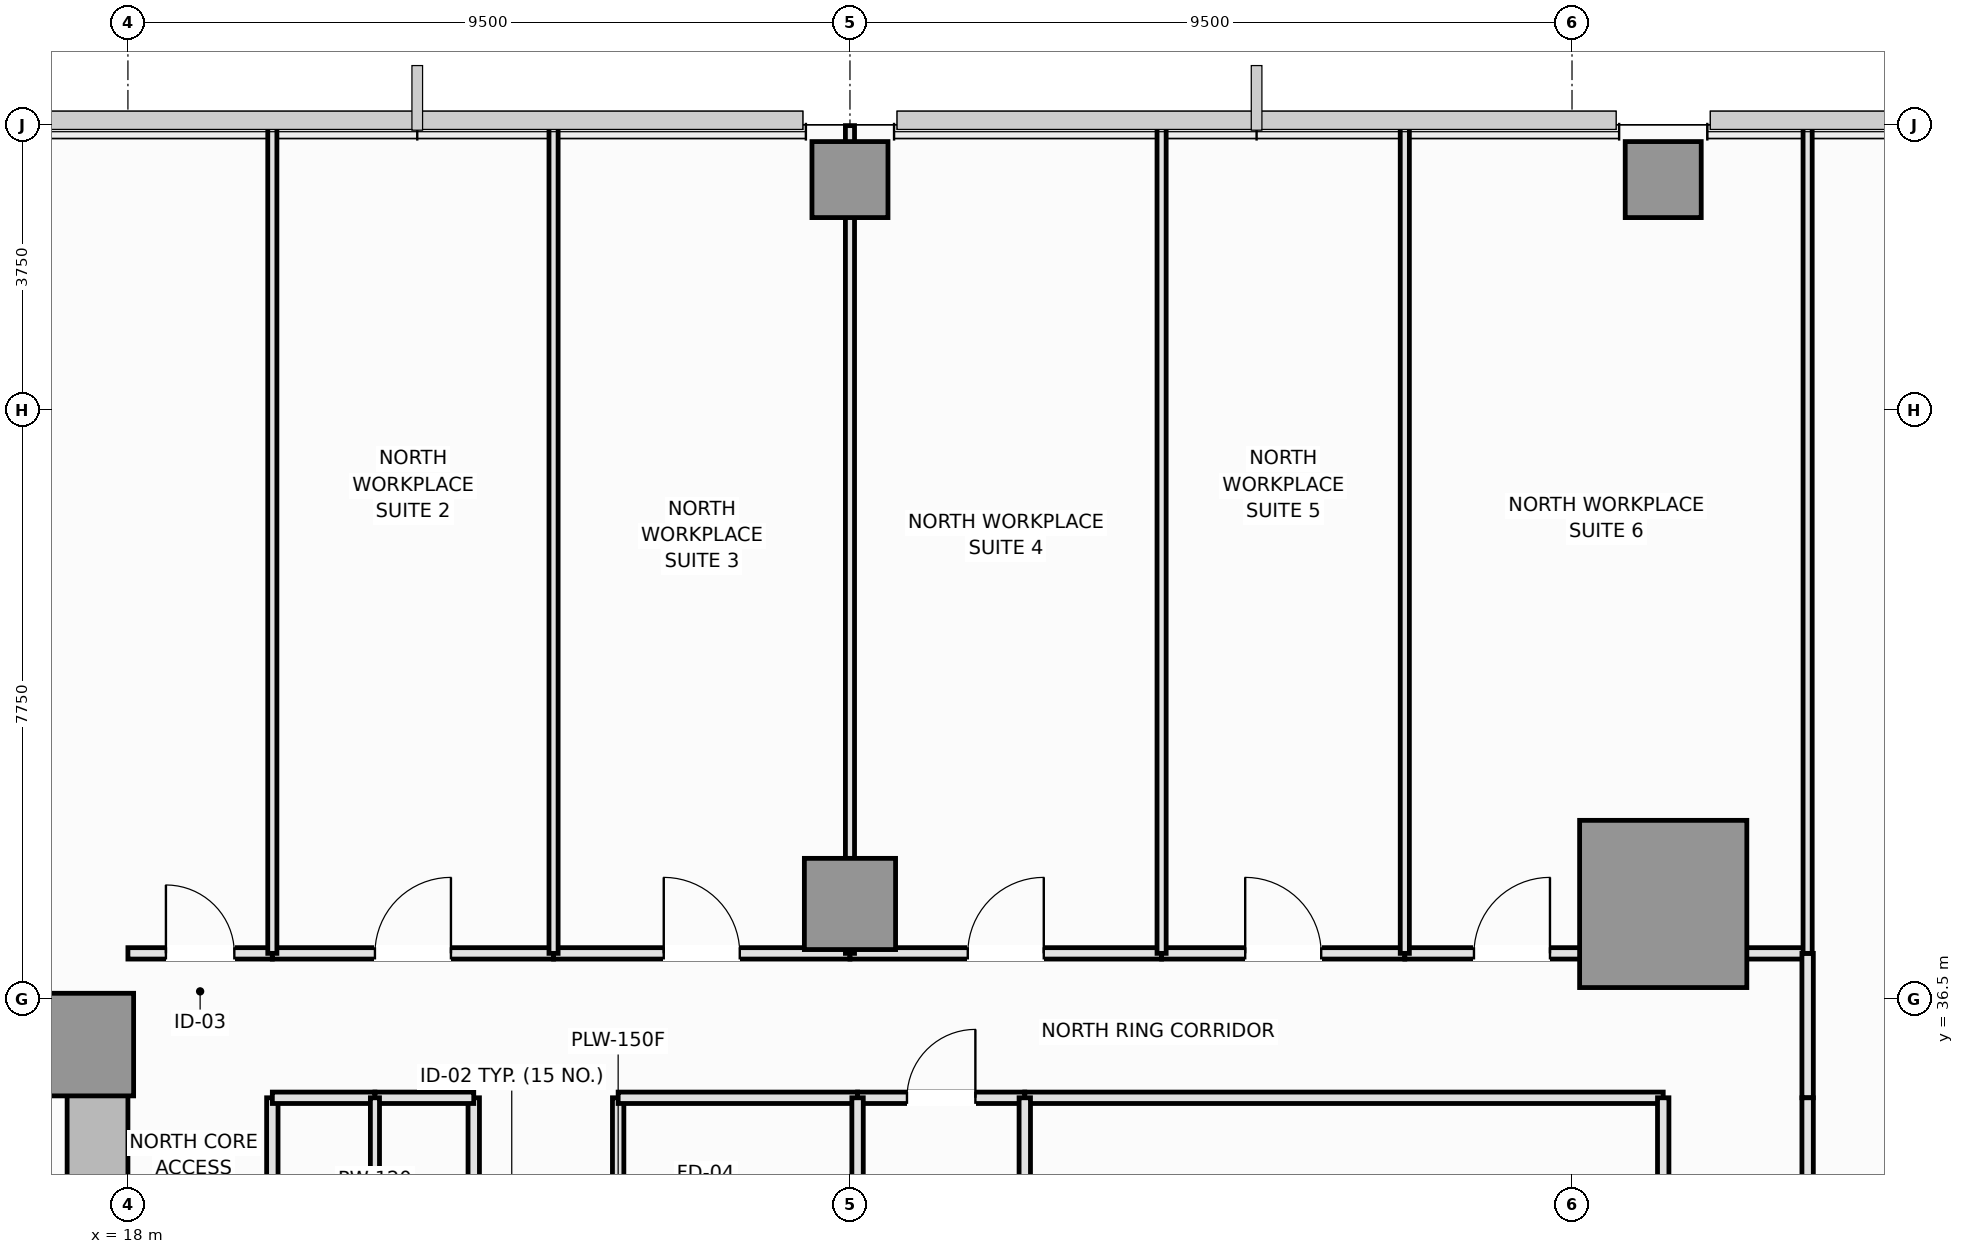
"""IFC4 building model, lengths in metres.
Left out: names, types, materials, properties, quantities, classifications, styles, units other than length and angle.
Written with IfcOpenShell. Run it as: python <this file> out.ifc"""

import sys

from ifc_helpers import new_model, si_unit, direction, frame, frame_2d, origin, origin_2d, place, context, subcontext, project, spatial, rectangle, extrude, element, fill, save


model = new_model("IFC4")
c1 = context("Model", 3, precision=1e-05, world=origin(), true_north=direction((0.0, 1.0)))
c2 = subcontext(c1, "Body", "Model", "MODEL_VIEW")
j1 = project(units=[si_unit("LENGTHUNIT", "METRE"), si_unit("PLANEANGLEUNIT", "RADIAN")], contexts=[c1])
p1 = place(None, origin())
s1 = spatial("IfcSite", under=j1, at=p1, CompositionType="ELEMENT")
p2 = place(p1, origin())
s2 = spatial("IfcBuilding", under=s1, at=p2, CompositionType="ELEMENT")
p3 = place(p2, frame((0.0, 0.0, 54.0)))
s3 = spatial("IfcBuildingStorey", under=s2, at=p3, CompositionType="ELEMENT", Elevation=54.0)
p4 = place(p3, frame((4.5, 36.1, 0.0), z_axis=(0.0, 0.0, 1.0), x_axis=(1.0, 0.0, 0.0)))
e1 = element("IfcWall", 1, at=p4, inside=s3, PredefinedType="SHEAR", context=c2, shape_type="SweptSolid", body=[
    extrude(rectangle(XDim=13.5, YDim=0.8, at=frame_2d((6.75, 0.0))), origin(), (0.0, 0.0, 1.0), 3.55),
])
p5 = place(p3, frame((17.6, 27.05, 0.0), z_axis=(0.0, 0.0, 1.0), x_axis=(0.0, 1.0, 0.0)))
e2 = element("IfcWall", 2, at=p5, inside=s3, PredefinedType="SHEAR", context=c2, shape_type="SweptSolid", body=[
    extrude(rectangle(XDim=8.65, YDim=0.8, at=frame_2d((4.325, 0.0))), origin(), (0.0, 0.0, 1.0), 3.55),
])
p6 = place(p5, frame((3.45, 0.0, 0.0)))
e3 = element("IfcOpeningElement", 3, at=p6, cuts=e2, PredefinedType="OPENING", context=c2, shape_type="SweptSolid", body=[
    extrude(rectangle(XDim=1.1, YDim=2.15, at=frame_2d((0.55, 1.075))), frame((0.0, 0.41, 0.0), z_axis=(0.0, -1.0, 0.0), x_axis=(1.0, 0.0, 0.0)), (0.0, 0.0, 1.0), 0.82),
])
p7 = place(p3, frame((17.4, 35.9, 0.0), z_axis=(0.0, 0.0, 1.0), x_axis=(1.0, 0.0, 0.0)))
e4 = element("IfcColumn", 4, at=p7, inside=s3, PredefinedType="PILASTER", context=c2, shape_type="SweptSolid", body=[
    extrude(rectangle(XDim=1.35, YDim=1.35, at=origin_2d()), origin(), (0.0, 0.0, 1.0), 3.55),
])
p8 = place(p3, frame((38.2, 37.75, 0.0), z_axis=(0.0, 0.0, 1.0), x_axis=(1.0, 0.0, 0.0)))
e5 = element("IfcColumn", 5, at=p8, inside=s3, PredefinedType="COLUMN", context=c2, shape_type="SweptSolid", body=[
    extrude(rectangle(XDim=2.2, YDim=2.2, at=origin_2d()), origin(), (0.0, 0.0, 1.0), 3.55),
])
p9 = place(p3, frame((27.5, 37.75, 0.0), z_axis=(0.0, 0.0, 1.0), x_axis=(1.0, 0.0, 0.0)))
e6 = element("IfcColumn", 6, at=p9, inside=s3, PredefinedType="COLUMN", context=c2, shape_type="SweptSolid", body=[
    extrude(rectangle(XDim=1.2, YDim=1.2, at=origin_2d()), origin(), (0.0, 0.0, 1.0), 3.55),
])
for number, where, z_axis, x_axis in (
    (7, (27.5, 47.28, 0.0), (0.0, 0.0, 1.0), (1.0, 0.0, 0.0)),
    (8, (38.2, 47.28, 0.0), (0.0, 0.0, 1.0), (1.0, 0.0, 0.0)),
):
    element("IfcColumn", number, at=place(p3, frame(where, z_axis=z_axis, x_axis=x_axis)), inside=s3, PredefinedType="COLUMN", context=c2, shape_type="SweptSolid", body=[
        extrude(rectangle(XDim=1.0, YDim=1.0, at=origin_2d()), origin(), (0.0, 0.0, 1.0), 3.55),
    ])
p10 = place(p3, frame((22.55, 29.75, 0.0), z_axis=(0.0, 0.0, 1.0), x_axis=(0.0, 1.0, 0.0)))
e9 = element("IfcWall", 9, at=p10, inside=s3, PredefinedType="PARTITIONING", context=c2, shape_type="SweptSolid", body=[
    extrude(rectangle(XDim=5.45, YDim=0.15, at=frame_2d((2.725, 0.0))), origin(), (0.0, 0.0, 1.0), 3.01),
])
p11 = place(p10, frame((2.225, 0.0, 0.0)))
e10 = element("IfcOpeningElement", 10, at=p11, cuts=e9, PredefinedType="OPENING", context=c2, shape_type="SweptSolid", body=[
    extrude(rectangle(XDim=1.0, YDim=2.15, at=frame_2d((0.5, 1.075))), frame((0.0, 0.085, 0.0), z_axis=(0.0, -1.0, 0.0), x_axis=(1.0, 0.0, 0.0)), (0.0, 0.0, 1.0), 0.17),
])
p12 = place(p3, frame((24.45, 32.1, 0.0), z_axis=(0.0, 0.0, 1.0), x_axis=(0.0, 1.0, 0.0)))
e11 = element("IfcWall", 11, at=p12, inside=s3, PredefinedType="PLUMBINGWALL", context=c2, shape_type="SweptSolid", body=[
    extrude(rectangle(XDim=3.1, YDim=0.15, at=frame_2d((1.55, 0.0))), origin(), (0.0, 0.0, 1.0), 3.37),
])
p13 = place(p12, frame((1.1, 0.0, 0.0)))
e12 = element("IfcOpeningElement", 12, at=p13, cuts=e11, PredefinedType="OPENING", context=c2, shape_type="SweptSolid", body=[
    extrude(rectangle(XDim=0.9, YDim=2.1, at=frame_2d((0.45, 1.05))), frame((0.0, 0.085, 0.0), z_axis=(0.0, -1.0, 0.0), x_axis=(1.0, 0.0, 0.0)), (0.0, 0.0, 1.0), 0.17),
])
p14 = place(p3, frame((19.9, 29.75, 0.0), z_axis=(0.0, 0.0, 1.0), x_axis=(0.0, 1.0, 0.0)))
e13 = element("IfcWall", 13, at=p14, inside=s3, PredefinedType="PARTITIONING", context=c2, shape_type="SweptSolid", body=[
    extrude(rectangle(XDim=5.45, YDim=0.15, at=frame_2d((2.725, 0.0))), origin(), (0.0, 0.0, 1.0), 3.37),
])
p15 = place(p14, frame((2.225, 0.0, 0.0)))
e14 = element("IfcOpeningElement", 14, at=p15, cuts=e13, PredefinedType="OPENING", context=c2, shape_type="SweptSolid", body=[
    extrude(rectangle(XDim=1.0, YDim=2.15, at=frame_2d((0.5, 1.075))), frame((0.0, 0.085, 0.0), z_axis=(0.0, -1.0, 0.0), x_axis=(1.0, 0.0, 0.0)), (0.0, 0.0, 1.0), 0.17),
])
p16 = place(p3, frame((19.9, 35.2, 0.0), z_axis=(0.0, 0.0, 1.0), x_axis=(1.0, 0.0, 0.0)))
e15 = element("IfcWall", 15, at=p16, inside=s3, PredefinedType="PARTITIONING", context=c2, shape_type="SweptSolid", body=[
    extrude(rectangle(XDim=1.35, YDim=0.15, at=frame_2d((0.675, 0.0))), origin(), (0.0, 0.0, 1.0), 3.37),
])
p17 = place(p3, frame((21.25, 35.2, 0.0), z_axis=(0.0, 0.0, 1.0), x_axis=(1.0, 0.0, 0.0)))
e16 = element("IfcWall", 16, at=p17, inside=s3, PredefinedType="PARTITIONING", context=c2, shape_type="SweptSolid", body=[
    extrude(rectangle(XDim=1.3, YDim=0.15, at=frame_2d((0.65, 0.0))), origin(), (0.0, 0.0, 1.0), 3.37),
])
p18 = place(p3, frame((24.45, 35.2, 0.0), z_axis=(0.0, 0.0, 1.0), x_axis=(1.0, 0.0, 0.0)))
e17 = element("IfcWall", 17, at=p18, inside=s3, PredefinedType="PLUMBINGWALL", context=c2, shape_type="SweptSolid", body=[
    extrude(rectangle(XDim=3.15, YDim=0.15, at=frame_2d((1.575, 0.0))), origin(), (0.0, 0.0, 1.0), 3.37),
])
p19 = place(p3, frame((27.6, 35.2, 0.0), z_axis=(0.0, 0.0, 1.0), x_axis=(1.0, 0.0, 0.0)))
e18 = element("IfcWall", 18, at=p19, inside=s3, PredefinedType="PLUMBINGWALL", context=c2, shape_type="SweptSolid", body=[
    extrude(rectangle(XDim=2.2, YDim=0.15, at=frame_2d((1.1, 0.0))), origin(), (0.0, 0.0, 1.0), 3.37),
])
p20 = place(p19, frame((0.65, 0.0, 0.0)))
e19 = element("IfcOpeningElement", 19, at=p20, cuts=e18, PredefinedType="OPENING", context=c2, shape_type="SweptSolid", body=[
    extrude(rectangle(XDim=0.9, YDim=2.1, at=frame_2d((0.45, 1.05))), frame((0.0, 0.085, 0.0), z_axis=(0.0, -1.0, 0.0), x_axis=(1.0, 0.0, 0.0)), (0.0, 0.0, 1.0), 0.17),
])
p21 = place(p3, frame((29.8, 35.2, 0.0), z_axis=(0.0, 0.0, 1.0), x_axis=(1.0, 0.0, 0.0)))
e20 = element("IfcWall", 20, at=p21, inside=s3, PredefinedType="PARTITIONING", context=c2, shape_type="SweptSolid", body=[
    extrude(rectangle(XDim=8.4, YDim=0.15, at=frame_2d((4.2, 0.0))), origin(), (0.0, 0.0, 1.0), 3.37),
])
p22 = place(p3, frame((18.0, 37.1, 0.0), z_axis=(0.0, 0.0, 1.0), x_axis=(1.0, 0.0, 0.0)))
e21 = element("IfcWall", 21, at=p22, inside=s3, PredefinedType="PARTITIONING", context=c2, shape_type="SweptSolid", body=[
    extrude(rectangle(XDim=1.9, YDim=0.15, at=frame_2d((0.95, 0.0))), origin(), (0.0, 0.0, 1.0), 3.37),
])
p23 = place(p22, frame((0.5, 0.0, 0.0)))
e22 = element("IfcOpeningElement", 22, at=p23, cuts=e21, PredefinedType="OPENING", context=c2, shape_type="SweptSolid", body=[
    extrude(rectangle(XDim=0.9, YDim=2.1, at=frame_2d((0.45, 1.05))), frame((0.0, 0.085, 0.0), z_axis=(0.0, -1.0, 0.0), x_axis=(1.0, 0.0, 0.0)), (0.0, 0.0, 1.0), 0.17),
])
p24 = place(p3, frame((19.9, 37.1, 0.0), z_axis=(0.0, 0.0, 1.0), x_axis=(1.0, 0.0, 0.0)))
e23 = element("IfcWall", 23, at=p24, inside=s3, PredefinedType="PARTITIONING", context=c2, shape_type="SweptSolid", body=[
    extrude(rectangle(XDim=3.7, YDim=0.15, at=frame_2d((1.85, 0.0))), origin(), (0.0, 0.0, 1.0), 3.37),
])
p25 = place(p24, frame((1.35, 0.0, 0.0)))
e24 = element("IfcOpeningElement", 24, at=p25, cuts=e23, PredefinedType="OPENING", context=c2, shape_type="SweptSolid", body=[
    extrude(rectangle(XDim=1.0, YDim=2.15, at=frame_2d((0.5, 1.075))), frame((0.0, 0.085, 0.0), z_axis=(0.0, -1.0, 0.0), x_axis=(1.0, 0.0, 0.0)), (0.0, 0.0, 1.0), 0.17),
])
p26 = place(p3, frame((23.6, 37.1, 0.0), z_axis=(0.0, 0.0, 1.0), x_axis=(1.0, 0.0, 0.0)))
e25 = element("IfcWall", 25, at=p26, inside=s3, PredefinedType="PARTITIONING", context=c2, shape_type="SweptSolid", body=[
    extrude(rectangle(XDim=3.9, YDim=0.15, at=frame_2d((1.95, 0.0))), origin(), (0.0, 0.0, 1.0), 3.37),
])
p27 = place(p26, frame((1.45, 0.0, 0.0)))
e26 = element("IfcOpeningElement", 26, at=p27, cuts=e25, PredefinedType="OPENING", context=c2, shape_type="SweptSolid", body=[
    extrude(rectangle(XDim=1.0, YDim=2.15, at=frame_2d((0.5, 1.075))), frame((0.0, 0.085, 0.0), z_axis=(0.0, -1.0, 0.0), x_axis=(1.0, 0.0, 0.0)), (0.0, 0.0, 1.0), 0.17),
])
p28 = place(p3, frame((27.5, 37.1, 0.0), z_axis=(0.0, 0.0, 1.0), x_axis=(1.0, 0.0, 0.0)))
e27 = element("IfcWall", 27, at=p28, inside=s3, PredefinedType="PARTITIONING", context=c2, shape_type="SweptSolid", body=[
    extrude(rectangle(XDim=4.1, YDim=0.15, at=frame_2d((2.05, 0.0))), origin(), (0.0, 0.0, 1.0), 3.37),
])
p29 = place(p28, frame((1.55, 0.0, 0.0)))
e28 = element("IfcOpeningElement", 28, at=p29, cuts=e27, PredefinedType="OPENING", context=c2, shape_type="SweptSolid", body=[
    extrude(rectangle(XDim=1.0, YDim=2.15, at=frame_2d((0.5, 1.075))), frame((0.0, 0.085, 0.0), z_axis=(0.0, -1.0, 0.0), x_axis=(1.0, 0.0, 0.0)), (0.0, 0.0, 1.0), 0.17),
])
p30 = place(p3, frame((31.6, 37.1, 0.0), z_axis=(0.0, 0.0, 1.0), x_axis=(1.0, 0.0, 0.0)))
e29 = element("IfcWall", 29, at=p30, inside=s3, PredefinedType="PARTITIONING", context=c2, shape_type="SweptSolid", body=[
    extrude(rectangle(XDim=3.2, YDim=0.15, at=frame_2d((1.6, 0.0))), origin(), (0.0, 0.0, 1.0), 3.37),
])
p31 = place(p30, frame((1.1, 0.0, 0.0)))
e30 = element("IfcOpeningElement", 30, at=p31, cuts=e29, PredefinedType="OPENING", context=c2, shape_type="SweptSolid", body=[
    extrude(rectangle(XDim=1.0, YDim=2.15, at=frame_2d((0.5, 1.075))), frame((0.0, 0.085, 0.0), z_axis=(0.0, -1.0, 0.0), x_axis=(1.0, 0.0, 0.0)), (0.0, 0.0, 1.0), 0.17),
])
p32 = place(p3, frame((34.8, 37.1, 0.0), z_axis=(0.0, 0.0, 1.0), x_axis=(1.0, 0.0, 0.0)))
e31 = element("IfcWall", 31, at=p32, inside=s3, PredefinedType="PARTITIONING", context=c2, shape_type="SweptSolid", body=[
    extrude(rectangle(XDim=5.3, YDim=0.15, at=frame_2d((2.65, 0.0))), origin(), (0.0, 0.0, 1.0), 3.37),
])
p33 = place(p32, frame((0.91, 0.0, 0.0)))
e32 = element("IfcOpeningElement", 32, at=p33, cuts=e31, PredefinedType="OPENING", context=c2, shape_type="SweptSolid", body=[
    extrude(rectangle(XDim=1.0, YDim=2.15, at=frame_2d((0.5, 1.075))), frame((0.0, 0.085, 0.0), z_axis=(0.0, -1.0, 0.0), x_axis=(1.0, 0.0, 0.0)), (0.0, 0.0, 1.0), 0.17),
])
p34 = place(p3, frame((40.1, 35.2, 0.0), z_axis=(0.0, 0.0, 1.0), x_axis=(0.0, 1.0, 0.0)))
e33 = element("IfcWall", 33, at=p34, inside=s3, PredefinedType="PARTITIONING", context=c2, shape_type="SweptSolid", body=[
    extrude(rectangle(XDim=1.9, YDim=0.15, at=frame_2d((0.95, 0.0))), origin(), (0.0, 0.0, 1.0), 3.37),
])
p35 = place(p3, frame((38.2, 32.1, 0.0), z_axis=(0.0, 0.0, 1.0), x_axis=(0.0, 1.0, 0.0)))
e34 = element("IfcWall", 34, at=p35, inside=s3, PredefinedType="PARTITIONING", context=c2, shape_type="SweptSolid", body=[
    extrude(rectangle(XDim=3.1, YDim=0.15, at=frame_2d((1.55, 0.0))), origin(), (0.0, 0.0, 1.0), 2.82),
])
p36 = place(p35, frame((1.05, 0.0, 0.0)))
e35 = element("IfcOpeningElement", 35, at=p36, cuts=e34, PredefinedType="OPENING", context=c2, shape_type="SweptSolid", body=[
    extrude(rectangle(XDim=1.0, YDim=2.15, at=frame_2d((0.5, 1.075))), frame((0.0, 0.085, 0.0), z_axis=(0.0, -1.0, 0.0), x_axis=(1.0, 0.0, 0.0)), (0.0, 0.0, 1.0), 0.17),
])
p37 = place(p3, frame((40.1, 32.0, 0.0), z_axis=(0.0, 0.0, 1.0), x_axis=(0.0, 1.0, 0.0)))
e36 = element("IfcWall", 36, at=p37, inside=s3, PredefinedType="PARTITIONING", context=c2, shape_type="SweptSolid", body=[
    extrude(rectangle(XDim=3.2, YDim=0.15, at=frame_2d((1.6, 0.0))), origin(), (0.0, 0.0, 1.0), 3.37),
])
p38 = place(p37, frame((1.1, 0.0, 0.0)))
e37 = element("IfcOpeningElement", 37, at=p38, cuts=e36, PredefinedType="OPENING", context=c2, shape_type="SweptSolid", body=[
    extrude(rectangle(XDim=1.0, YDim=2.15, at=frame_2d((0.5, 1.075))), frame((0.0, 0.085, 0.0), z_axis=(0.0, -1.0, 0.0), x_axis=(1.0, 0.0, 0.0)), (0.0, 0.0, 1.0), 0.17),
])
p39 = place(p3, frame((21.25, 29.75, 0.0), z_axis=(0.0, 0.0, 1.0), x_axis=(0.0, 1.0, 0.0)))
e38 = element("IfcWall", 38, at=p39, inside=s3, PredefinedType="PARTITIONING", context=c2, shape_type="SweptSolid", body=[
    extrude(rectangle(XDim=5.45, YDim=0.12, at=frame_2d((2.725, 0.0))), origin(), (0.0, 0.0, 1.0), 3.37),
])
for number, where, z_axis, x_axis in (
    (39, (27.6, 32.1, 0.0), (0.0, 0.0, 1.0), (0.0, 1.0, 0.0)),
    (40, (29.8, 32.1, 0.0), (0.0, 0.0, 1.0), (0.0, 1.0, 0.0)),
):
    element("IfcWall", number, at=place(p3, frame(where, z_axis=z_axis, x_axis=x_axis)), inside=s3, PredefinedType="PLUMBINGWALL", context=c2, shape_type="SweptSolid", body=[
        extrude(rectangle(XDim=3.1, YDim=0.15, at=frame_2d((1.55, 0.0))), origin(), (0.0, 0.0, 1.0), 3.37),
    ])
for number, where, z_axis, x_axis in (
    (41, (19.9, 37.1, 0.0), (0.0, 0.0, 1.0), (0.0, 1.0, 0.0)),
    (42, (23.6, 37.1, 0.0), (0.0, 0.0, 1.0), (0.0, 1.0, 0.0)),
):
    element("IfcWall", number, at=place(p3, frame(where, z_axis=z_axis, x_axis=x_axis)), inside=s3, PredefinedType="PARTITIONING", context=c2, shape_type="SweptSolid", body=[
        extrude(rectangle(XDim=10.89, YDim=0.12, at=frame_2d((5.445, 0.0))), origin(), (0.0, 0.0, 1.0), 3.37),
    ])
p40 = place(p3, frame((27.5, 37.1, 0.0), z_axis=(0.0, 0.0, 1.0), x_axis=(0.0, 1.0, 0.0)))
e43 = element("IfcWall", 43, at=p40, inside=s3, PredefinedType="PARTITIONING", context=c2, shape_type="SweptSolid", body=[
    extrude(rectangle(XDim=10.89, YDim=0.12, at=frame_2d((5.445, 0.0))), origin(), (0.0, 0.0, 1.0), 2.82),
])
for number, where, z_axis, x_axis in (
    (44, (31.6, 37.1, 0.0), (0.0, 0.0, 1.0), (0.0, 1.0, 0.0)),
    (45, (34.8, 37.1, 0.0), (0.0, 0.0, 1.0), (0.0, 1.0, 0.0)),
    (46, (40.1, 37.1, 0.0), (0.0, 0.0, 1.0), (0.0, 1.0, 0.0)),
):
    element("IfcWall", number, at=place(p3, frame(where, z_axis=z_axis, x_axis=x_axis)), inside=s3, PredefinedType="PARTITIONING", context=c2, shape_type="SweptSolid", body=[
        extrude(rectangle(XDim=10.89, YDim=0.12, at=frame_2d((5.445, 0.0))), origin(), (0.0, 0.0, 1.0), 3.37),
    ])
p41 = place(p20, origin())
e47 = element("IfcDoor", 47, at=p41, inside=s3, OperationType="SINGLE_SWING_RIGHT", PredefinedType="DOOR", context=c2, shape_type="SweptSolid", body=[
    extrude(rectangle(XDim=0.9, YDim=2.1, at=frame_2d((0.45, 1.05))), frame((0.0, 0.025, 0.0), z_axis=(0.0, -1.0, 0.0), x_axis=(1.0, 0.0, 0.0)), (0.0, 0.0, 1.0), 0.05),
])
fill(e19, e47)
p42 = place(p23, origin())
e48 = element("IfcDoor", 48, at=p42, inside=s3, OperationType="SINGLE_SWING_LEFT", PredefinedType="DOOR", context=c2, shape_type="SweptSolid", body=[
    extrude(rectangle(XDim=0.9, YDim=2.1, at=frame_2d((0.45, 1.05))), frame((0.0, 0.025, 0.0), z_axis=(0.0, -1.0, 0.0), x_axis=(1.0, 0.0, 0.0)), (0.0, 0.0, 1.0), 0.05),
])
fill(e22, e48)
p43 = place(p25, origin())
e49 = element("IfcDoor", 49, at=p43, inside=s3, OperationType="SINGLE_SWING_RIGHT", PredefinedType="DOOR", context=c2, shape_type="SweptSolid", body=[
    extrude(rectangle(XDim=1.0, YDim=2.15, at=frame_2d((0.5, 1.075))), frame((0.0, 0.025, 0.0), z_axis=(0.0, -1.0, 0.0), x_axis=(1.0, 0.0, 0.0)), (0.0, 0.0, 1.0), 0.05),
])
fill(e24, e49)
p44 = place(p27, origin())
e50 = element("IfcDoor", 50, at=p44, inside=s3, OperationType="SINGLE_SWING_LEFT", PredefinedType="DOOR", context=c2, shape_type="SweptSolid", body=[
    extrude(rectangle(XDim=1.0, YDim=2.15, at=frame_2d((0.5, 1.075))), frame((0.0, 0.025, 0.0), z_axis=(0.0, -1.0, 0.0), x_axis=(1.0, 0.0, 0.0)), (0.0, 0.0, 1.0), 0.05),
])
fill(e26, e50)
p45 = place(p29, origin())
e51 = element("IfcDoor", 51, at=p45, inside=s3, OperationType="SINGLE_SWING_RIGHT", PredefinedType="DOOR", context=c2, shape_type="SweptSolid", body=[
    extrude(rectangle(XDim=1.0, YDim=2.15, at=frame_2d((0.5, 1.075))), frame((0.0, 0.025, 0.0), z_axis=(0.0, -1.0, 0.0), x_axis=(1.0, 0.0, 0.0)), (0.0, 0.0, 1.0), 0.05),
])
fill(e28, e51)
p46 = place(p31, origin())
e52 = element("IfcDoor", 52, at=p46, inside=s3, OperationType="SINGLE_SWING_LEFT", PredefinedType="DOOR", context=c2, shape_type="SweptSolid", body=[
    extrude(rectangle(XDim=1.0, YDim=2.15, at=frame_2d((0.5, 1.075))), frame((0.0, 0.025, 0.0), z_axis=(0.0, -1.0, 0.0), x_axis=(1.0, 0.0, 0.0)), (0.0, 0.0, 1.0), 0.05),
])
fill(e30, e52)
p47 = place(p33, origin())
e53 = element("IfcDoor", 53, at=p47, inside=s3, OperationType="SINGLE_SWING_RIGHT", PredefinedType="DOOR", context=c2, shape_type="SweptSolid", body=[
    extrude(rectangle(XDim=1.0, YDim=2.15, at=frame_2d((0.5, 1.075))), frame((0.0, 0.025, 0.0), z_axis=(0.0, -1.0, 0.0), x_axis=(1.0, 0.0, 0.0)), (0.0, 0.0, 1.0), 0.05),
])
fill(e32, e53)
save(model, sys.argv[1])
